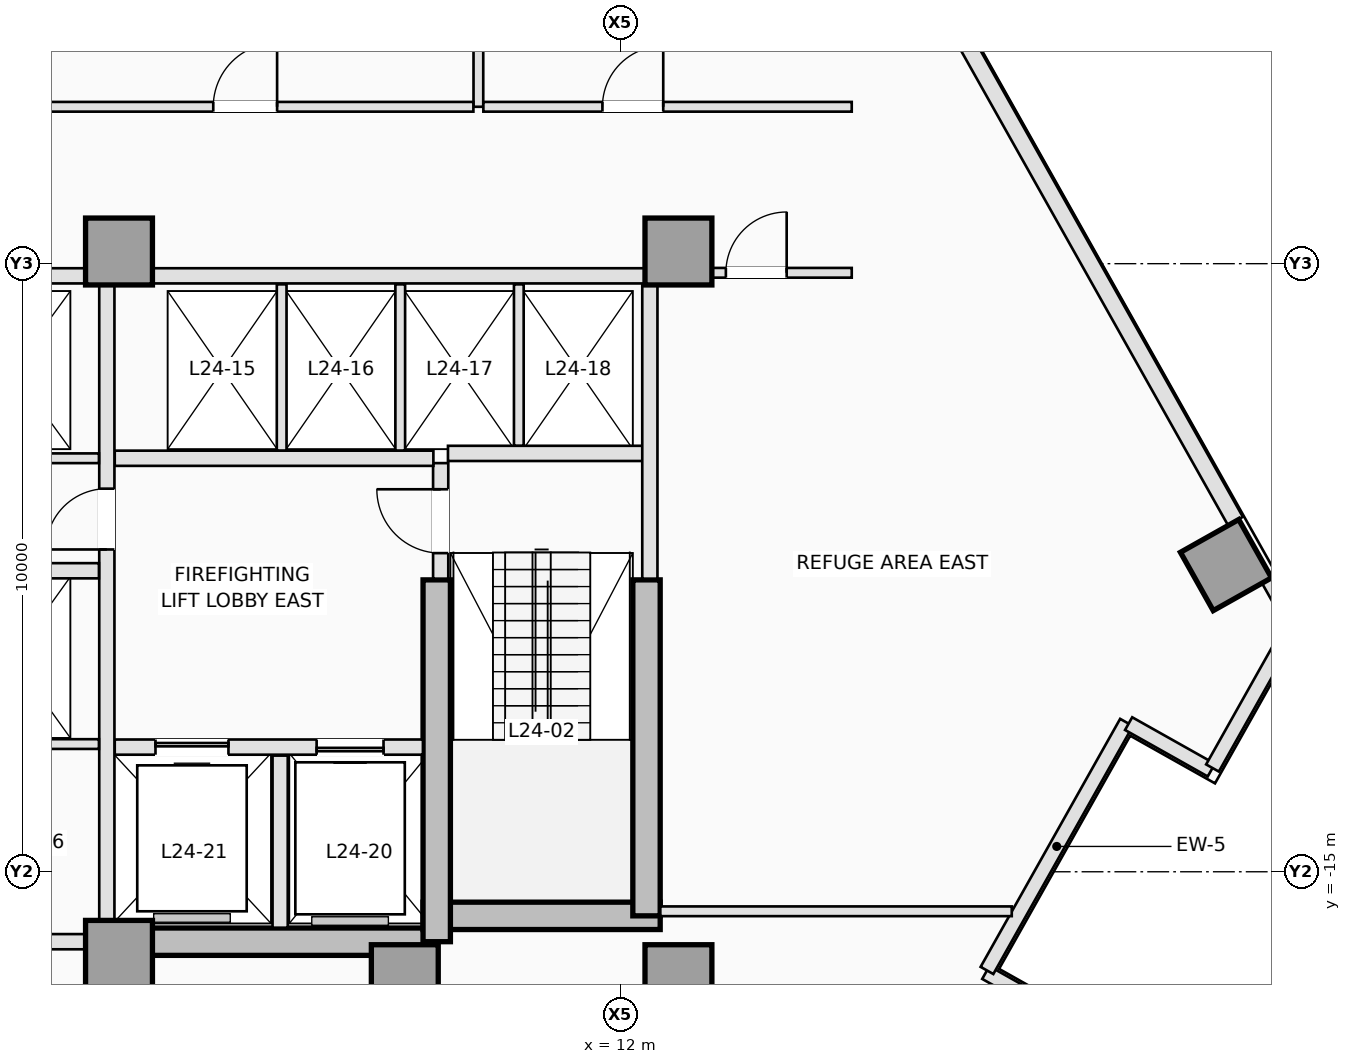
"""IFC4 building model, lengths in metres.
Left out: names, types, materials, properties, quantities, classifications, styles, units other than length and angle.
Written with IfcOpenShell. Run it as: python <this file> out.ifc"""

import sys

from ifc_helpers import new_model, si_unit, direction, frame, frame_2d, origin, origin_2d, place, context, subcontext, project, spatial, rectangle, extrude, element, fill, save


model = new_model("IFC4")
c1 = context("Model", 3, precision=1e-05, world=origin(), true_north=direction((0.0, 1.0)))
c2 = subcontext(c1, "Body", "Model", "MODEL_VIEW")
j1 = project(units=[si_unit("LENGTHUNIT", "METRE"), si_unit("PLANEANGLEUNIT", "RADIAN")], contexts=[c1])
p1 = place(None, origin())
s1 = spatial("IfcSite", under=j1, at=p1, CompositionType="ELEMENT")
p2 = place(p1, origin())
s2 = spatial("IfcBuilding", under=s1, at=p2, CompositionType="ELEMENT")
p3 = place(p2, frame((0.0, 0.0, 90.6)))
s3 = spatial("IfcBuildingStorey", under=s2, at=p3, CompositionType="ELEMENT", Elevation=90.6)
p4 = place(p3, frame((3.75, -16.15, 0.0), z_axis=(0.0, 0.0, 1.0), x_axis=(1.0, 0.0, 0.0)))
e1 = element("IfcWall", 1, at=p4, inside=s3, PredefinedType="SHEAR", context=c2, shape_type="SweptSolid", body=[
    extrude(rectangle(XDim=5.225, YDim=0.45, at=frame_2d((2.613, 0.0))), origin(), (0.0, 0.0, 1.0), 4.4),
])
p5 = place(p3, frame((8.75, -15.725, 0.0), z_axis=(0.0, 0.0, 1.0), x_axis=(1.0, 0.0, 0.0)))
e2 = element("IfcWall", 2, at=p5, inside=s3, PredefinedType="SHEAR", context=c2, shape_type="SweptSolid", body=[
    extrude(rectangle(XDim=3.9, YDim=0.45, at=frame_2d((1.95, 0.0))), origin(), (0.0, 0.0, 1.0), 4.4),
])
p6 = place(p3, frame((12.425, -15.725, 0.0), z_axis=(0.0, 0.0, 1.0), x_axis=(0.0, 1.0, 0.0)))
e3 = element("IfcWall", 3, at=p6, inside=s3, PredefinedType="SHEAR", context=c2, shape_type="SweptSolid", body=[
    extrude(rectangle(XDim=5.525, YDim=0.45, at=frame_2d((2.763, 0.0))), origin(), (0.0, 0.0, 1.0), 4.4),
])
p7 = place(p3, frame((8.975, -16.15, 0.0), z_axis=(0.0, 0.0, 1.0), x_axis=(0.0, 1.0, 0.0)))
e4 = element("IfcWall", 4, at=p7, inside=s3, PredefinedType="SHEAR", context=c2, shape_type="SweptSolid", body=[
    extrude(rectangle(XDim=5.95, YDim=0.45, at=frame_2d((2.975, 0.0))), origin(), (0.0, 0.0, 1.0), 4.4),
])
for number, where, z_axis, x_axis in (
    (5, (3.75, -16.35, 0.0), (0.0, 0.0, 1.0), (1.0, 0.0, 0.0)),
    (6, (8.45, -16.75, 0.0), (0.0, 0.0, 1.0), (1.0, 0.0, 0.0)),
    (7, (12.95, -16.75, 0.0), (0.0, 0.0, 1.0), (1.0, 0.0, 0.0)),
    (8, (3.75, -4.8, 0.0), (0.0, 0.0, 1.0), (1.0, 0.0, 0.0)),
    (9, (12.95, -4.8, 0.0), (0.0, 0.0, 1.0), (1.0, 0.0, 0.0)),
    (10, (21.955, -9.957, 0.0), (0.0, 0.0, 1.0), (0.872, 0.49, 0.0)),
):
    element("IfcColumn", number, at=place(p3, frame(where, z_axis=z_axis, x_axis=x_axis)), inside=s3, PredefinedType="COLUMN", context=c2, shape_type="SweptSolid", body=[
        extrude(rectangle(XDim=1.1, YDim=1.1, at=origin_2d()), origin(), (0.0, 0.0, 1.0), 4.4),
    ])
p8 = place(p3, frame((22.654, -10.2, 0.0), z_axis=(0.0, 0.0, 1.0), x_axis=(0.490355003566, -0.871522788272, 0.0)))
e11 = element("IfcWall", 11, at=p8, inside=s3, PredefinedType="STANDARD", context=c2, shape_type="SweptSolid", body=[
    extrude(rectangle(XDim=0.865, YDim=0.24, at=frame_2d((0.433, 0.0))), origin(), (0.0, 0.0, 1.0), 4.15),
])
p9 = place(p3, frame((17.029, -0.2, 0.0), z_axis=(0.0, 0.0, 1.0), x_axis=(0.49024893553, -0.871582458068, 0.0)))
e12 = element("IfcWall", 12, at=p9, inside=s3, PredefinedType="STANDARD", context=c2, shape_type="SweptSolid", body=[
    extrude(rectangle(XDim=10.363, YDim=0.28, at=frame_2d((5.181, 0.0))), origin(), (0.0, 0.0, 1.0), 4.15),
])
p10 = place(p3, frame((19.399, -17.442, 0.0), z_axis=(0.0, 0.0, 1.0), x_axis=(-0.871575537125, 0.490261239633, 0.0)))
e13 = element("IfcWall", 13, at=p10, inside=s3, PredefinedType="STANDARD", context=c2, shape_type="SweptSolid", body=[
    extrude(rectangle(XDim=1.6, YDim=0.24, at=frame_2d((0.8, 0.0))), origin(), (0.0, 0.0, 1.0), 4.15),
])
p11 = place(p3, frame((18.024, -16.623, 0.0), z_axis=(0.0, 0.0, 1.0), x_axis=(0.490273623647, 0.871568571001, 0.0)))
e14 = element("IfcWall", 14, at=p11, inside=s3, PredefinedType="STANDARD", context=c2, shape_type="SweptSolid", body=[
    extrude(rectangle(XDim=4.68, YDim=0.24, at=frame_2d((2.34, 0.0))), origin(), (0.0, 0.0, 1.0), 3.622),
])
p12 = place(p3, frame((20.354, -12.564, 0.0), z_axis=(0.0, 0.0, 1.0), x_axis=(0.871546278971, -0.490313250496, 0.0)))
e15 = element("IfcWall", 15, at=p12, inside=s3, PredefinedType="STANDARD", context=c2, shape_type="SweptSolid", body=[
    extrude(rectangle(XDim=1.56, YDim=0.24, at=frame_2d((0.78, 0.0))), origin(), (0.0, 0.0, 1.0), 4.15),
])
p13 = place(p3, frame((21.733, -13.294, 0.0), z_axis=(0.0, 0.0, 1.0), x_axis=(0.490265590412, 0.871573089797, 0.0)))
e16 = element("IfcWall", 16, at=p13, inside=s3, PredefinedType="STANDARD", context=c2, shape_type="SweptSolid", body=[
    extrude(rectangle(XDim=2.664, YDim=0.24, at=frame_2d((1.332, 0.0))), origin(), (0.0, 0.0, 1.0), 4.15),
])
p14 = place(p3, frame((9.04, -10.18, 0.0), z_axis=(0.0, 0.0, 1.0), x_axis=(0.0, 1.0, 0.0)))
e17 = element("IfcWall", 17, at=p14, inside=s3, PredefinedType="PARTITIONING", context=c2, shape_type="SweptSolid", body=[
    extrude(rectangle(XDim=1.9, YDim=0.25, at=frame_2d((0.95, 0.0))), origin(), (0.0, 0.0, 1.0), 4.15),
])
p15 = place(p14, frame((0.42, 0.0, 0.0)))
e18 = element("IfcOpeningElement", 18, at=p15, cuts=e17, PredefinedType="OPENING", context=c2, shape_type="SweptSolid", body=[
    extrude(rectangle(XDim=1.05, YDim=2.15, at=frame_2d((0.525, 1.075))), frame((0.0, 0.135, 0.0), z_axis=(0.0, -1.0, 0.0), x_axis=(1.0, 0.0, 0.0)), (0.0, 0.0, 1.0), 0.27),
])
p16 = place(p3, frame((9.16, -8.12, 0.0), z_axis=(0.0, 0.0, 1.0), x_axis=(1.0, 0.0, 0.0)))
e19 = element("IfcWall", 19, at=p16, inside=s3, PredefinedType="PARTITIONING", context=c2, shape_type="SweptSolid", body=[
    extrude(rectangle(XDim=3.22, YDim=0.25, at=frame_2d((1.61, 0.0))), origin(), (0.0, 0.0, 1.0), 4.15),
])
p17 = place(p3, frame((12.48, -10.18, 0.0), z_axis=(0.0, 0.0, 1.0), x_axis=(0.0, 1.0, 0.0)))
e20 = element("IfcWall", 20, at=p17, inside=s3, PredefinedType="PARTITIONING", context=c2, shape_type="SweptSolid", body=[
    extrude(rectangle(XDim=4.828, YDim=0.25, at=frame_2d((2.414, 0.0))), origin(), (0.0, 0.0, 1.0), 4.15),
])
p18 = place(p3, frame((3.68, -12.95, 0.0), z_axis=(0.0, 0.0, 1.0), x_axis=(1.0, 0.0, 0.0)))
e21 = element("IfcWall", 21, at=p18, inside=s3, PredefinedType="PARTITIONING", context=c2, shape_type="SweptSolid", body=[
    extrude(rectangle(XDim=5.068, YDim=0.25, at=frame_2d((2.534, 0.0))), origin(), (0.0, 0.0, 1.0), 4.15),
])
p19 = place(p18, frame((3.32, 0.0, 0.0)))
e22 = element("IfcOpeningElement", 22, at=p19, cuts=e21, PredefinedType="OPENING", context=c2, shape_type="SweptSolid", body=[
    extrude(rectangle(XDim=1.1, YDim=2.15, at=frame_2d((0.55, 1.075))), frame((0.0, 0.135, 0.0), z_axis=(0.0, -1.0, 0.0), x_axis=(1.0, 0.0, 0.0)), (0.0, 0.0, 1.0), 0.27),
])
p20 = place(p18, frame((0.67, 0.0, 0.0)))
e23 = element("IfcOpeningElement", 23, at=p20, cuts=e21, PredefinedType="OPENING", context=c2, shape_type="SweptSolid", body=[
    extrude(rectangle(XDim=1.2, YDim=2.15, at=frame_2d((0.6, 1.075))), frame((0.0, 0.135, 0.0), z_axis=(0.0, -1.0, 0.0), x_axis=(1.0, 0.0, 0.0)), (0.0, 0.0, 1.0), 0.27),
])
p21 = place(p3, frame((6.4, -15.92, 0.0), z_axis=(0.0, 0.0, 1.0), x_axis=(0.0, 1.0, 0.0)))
e24 = element("IfcWall", 24, at=p21, inside=s3, PredefinedType="PARTITIONING", context=c2, shape_type="SweptSolid", body=[
    extrude(rectangle(XDim=2.83, YDim=0.25, at=frame_2d((1.415, 0.0))), origin(), (0.0, 0.0, 1.0), 4.15),
])
p22 = place(p3, frame((3.68, -8.2, 0.0), z_axis=(0.0, 0.0, 1.0), x_axis=(1.0, 0.0, 0.0)))
e25 = element("IfcWall", 25, at=p22, inside=s3, PredefinedType="PARTITIONING", context=c2, shape_type="SweptSolid", body=[
    extrude(rectangle(XDim=5.24, YDim=0.25, at=frame_2d((2.62, 0.0))), origin(), (0.0, 0.0, 1.0), 4.15),
])
p23 = place(p3, frame((3.55, -15.798, 0.0), z_axis=(0.0, 0.0, 1.0), x_axis=(0.0, 1.0, 0.0)))
e26 = element("IfcWall", 26, at=p23, inside=s3, PredefinedType="PARTITIONING", context=c2, shape_type="SweptSolid", body=[
    extrude(rectangle(XDim=10.446, YDim=0.25, at=frame_2d((5.223, 0.0))), origin(), (0.0, 0.0, 1.0), 4.15),
])
p24 = place(p23, frame((6.098, 0.0, 0.0)))
e27 = element("IfcOpeningElement", 27, at=p24, cuts=e26, PredefinedType="OPENING", context=c2, shape_type="SweptSolid", body=[
    extrude(rectangle(XDim=1.0, YDim=2.15, at=frame_2d((0.5, 1.075))), frame((0.0, 0.135, 0.0), z_axis=(0.0, -1.0, 0.0), x_axis=(1.0, 0.0, 0.0)), (0.0, 0.0, 1.0), 0.27),
])
p25 = place(p3, frame((4.302, -5.2, 0.0), z_axis=(0.0, 0.0, 1.0), x_axis=(1.0, 0.0, 0.0)))
e28 = element("IfcWall", 28, at=p25, inside=s3, PredefinedType="PARTITIONING", context=c2, shape_type="SweptSolid", body=[
    extrude(rectangle(XDim=8.096, YDim=0.25, at=frame_2d((4.048, 0.0))), origin(), (0.0, 0.0, 1.0), 4.15),
])
p26 = place(p3, frame((0.95, -5.2, 0.0), z_axis=(0.0, 0.0, 1.0), x_axis=(1.0, 0.0, 0.0)))
e29 = element("IfcWall", 29, at=p26, inside=s3, PredefinedType="PARTITIONING", context=c2, shape_type="SweptSolid", body=[
    extrude(rectangle(XDim=2.248, YDim=0.25, at=frame_2d((1.124, 0.0))), origin(), (0.0, 0.0, 1.0), 4.15),
])
for number, where, z_axis, x_axis in (
    (30, (6.425, -8.073, 0.0), (0.0, 0.0, 1.0), (0.0, 1.0, 0.0)),
    (31, (8.375, -8.073, 0.0), (0.0, 0.0, 1.0), (0.0, 1.0, 0.0)),
):
    element("IfcWall", number, at=place(p3, frame(where, z_axis=z_axis, x_axis=x_axis)), inside=s3, PredefinedType="PARTITIONING", context=c2, shape_type="SweptSolid", body=[
        extrude(rectangle(XDim=2.733, YDim=0.16, at=frame_2d((1.366, 0.0))), origin(), (0.0, 0.0, 1.0), 4.15),
    ])
p27 = place(p3, frame((10.325, -7.993, 0.0), z_axis=(0.0, 0.0, 1.0), x_axis=(0.0, 1.0, 0.0)))
e32 = element("IfcWall", 32, at=p27, inside=s3, PredefinedType="PARTITIONING", context=c2, shape_type="SweptSolid", body=[
    extrude(rectangle(XDim=2.653, YDim=0.16, at=frame_2d((1.326, 0.0))), origin(), (0.0, 0.0, 1.0), 4.15),
])
p28 = place(p3, frame((-3.198, -16.15, 0.0), z_axis=(0.0, 0.0, 1.0), x_axis=(1.0, 0.0, 0.0)))
e33 = element("IfcWall", 33, at=p28, inside=s3, PredefinedType="PARTITIONING", context=c2, shape_type="SweptSolid", body=[
    extrude(rectangle(XDim=6.396, YDim=0.25, at=frame_2d((3.198, 0.0))), origin(), (0.0, 0.0, 1.0), 3.2),
])
p29 = place(p3, frame((0.95, -8.2, 0.0), z_axis=(0.0, 0.0, 1.0), x_axis=(1.0, 0.0, 0.0)))
e34 = element("IfcWall", 34, at=p29, inside=s3, PredefinedType="PARTITIONING", context=c2, shape_type="SweptSolid", body=[
    extrude(rectangle(XDim=2.47, YDim=0.16, at=frame_2d((1.235, 0.0))), origin(), (0.0, 0.0, 1.0), 4.15),
])
p30 = place(p3, frame((0.95, -10.05, 0.0), z_axis=(0.0, 0.0, 1.0), x_axis=(1.0, 0.0, 0.0)))
e35 = element("IfcWall", 35, at=p30, inside=s3, PredefinedType="PARTITIONING", context=c2, shape_type="SweptSolid", body=[
    extrude(rectangle(XDim=2.47, YDim=0.25, at=frame_2d((1.235, 0.0))), origin(), (0.0, 0.0, 1.0), 4.15),
])
p31 = place(p3, frame((-3.42, -12.9, 0.0), z_axis=(0.0, 0.0, 1.0), x_axis=(1.0, 0.0, 0.0)))
e36 = element("IfcWall", 36, at=p31, inside=s3, PredefinedType="PARTITIONING", context=c2, shape_type="SweptSolid", body=[
    extrude(rectangle(XDim=6.84, YDim=0.16, at=frame_2d((3.42, 0.0))), origin(), (0.0, 0.0, 1.0), 4.15),
])
p32 = place(p31, frame((2.98, 0.0, 0.0)))
e37 = element("IfcOpeningElement", 37, at=p32, cuts=e36, PredefinedType="OPENING", context=c2, shape_type="SweptSolid", body=[
    extrude(rectangle(XDim=0.88, YDim=2.12, at=frame_2d((0.44, 1.06))), frame((0.0, 0.09, 0.0), z_axis=(0.0, -1.0, 0.0), x_axis=(1.0, 0.0, 0.0)), (0.0, 0.0, 1.0), 0.18),
])
p33 = place(p3, frame((9.66, -2.42, 0.0), z_axis=(0.0, 0.0, 1.0), x_axis=(0.0, 1.0, 0.0)))
e38 = element("IfcWall", 38, at=p33, inside=s3, PredefinedType="PARTITIONING", context=c2, shape_type="SweptSolid", body=[
    extrude(rectangle(XDim=6.62, YDim=0.16, at=frame_2d((3.31, 0.0))), origin(), (0.0, 0.0, 1.0), 4.15),
])
p34 = place(p3, frame((12.652, -15.65, 0.0), z_axis=(0.0, 0.0, 1.0), x_axis=(1.0, 0.0, 0.0)))
e39 = element("IfcWall", 39, at=p34, inside=s3, PredefinedType="PARTITIONING", context=c2, shape_type="SweptSolid", body=[
    extrude(rectangle(XDim=5.779, YDim=0.16, at=frame_2d((2.89, 0.0))), origin(), (0.0, 0.0, 1.0), 4.15),
])
p35 = place(p3, frame((1.1, -2.42, 0.0), z_axis=(0.0, 0.0, 1.0), x_axis=(1.0, 0.0, 0.0)))
e40 = element("IfcWall", 40, at=p35, inside=s3, PredefinedType="PARTITIONING", context=c2, shape_type="SweptSolid", body=[
    extrude(rectangle(XDim=8.478, YDim=0.16, at=frame_2d((4.239, 0.0))), origin(), (0.0, 0.0, 1.0), 4.15),
])
p36 = place(p35, frame((4.2, 0.0, 0.0)))
e41 = element("IfcOpeningElement", 41, at=p36, cuts=e40, PredefinedType="OPENING", context=c2, shape_type="SweptSolid", body=[
    extrude(rectangle(XDim=1.05, YDim=2.12, at=frame_2d((0.525, 1.06))), frame((0.0, 0.09, 0.0), z_axis=(0.0, -1.0, 0.0), x_axis=(1.0, 0.0, 0.0)), (0.0, 0.0, 1.0), 0.18),
])
p37 = place(p3, frame((9.742, -2.42, 0.0), z_axis=(0.0, 0.0, 1.0), x_axis=(1.0, 0.0, 0.0)))
e42 = element("IfcWall", 42, at=p37, inside=s3, PredefinedType="PARTITIONING", context=c2, shape_type="SweptSolid", body=[
    extrude(rectangle(XDim=6.058, YDim=0.16, at=frame_2d((3.029, 0.0))), origin(), (0.0, 0.0, 1.0), 4.15),
])
p38 = place(p37, frame((1.958, 0.0, 0.0)))
e43 = element("IfcOpeningElement", 43, at=p38, cuts=e42, PredefinedType="OPENING", context=c2, shape_type="SweptSolid", body=[
    extrude(rectangle(XDim=1.0, YDim=2.15, at=frame_2d((0.5, 1.075))), frame((0.0, 0.09, 0.0), z_axis=(0.0, -1.0, 0.0), x_axis=(1.0, 0.0, 0.0)), (0.0, 0.0, 1.0), 0.18),
])
p39 = place(p3, frame((13.502, -5.15, 0.0), z_axis=(0.0, 0.0, 1.0), x_axis=(1.0, 0.0, 0.0)))
e44 = element("IfcWall", 44, at=p39, inside=s3, PredefinedType="PARTITIONING", context=c2, shape_type="SweptSolid", body=[
    extrude(rectangle(XDim=2.298, YDim=0.16, at=frame_2d((1.149, 0.0))), origin(), (0.0, 0.0, 1.0), 4.15),
])
p40 = place(p39, frame((0.228, 0.0, 0.0)))
e45 = element("IfcOpeningElement", 45, at=p40, cuts=e44, PredefinedType="OPENING", context=c2, shape_type="SweptSolid", body=[
    extrude(rectangle(XDim=1.0, YDim=2.15, at=frame_2d((0.5, 1.075))), frame((0.0, 0.09, 0.0), z_axis=(0.0, -1.0, 0.0), x_axis=(1.0, 0.0, 0.0)), (0.0, 0.0, 1.0), 0.18),
])
p41 = place(p19, origin())
e46 = element("IfcDoor", 46, at=p41, inside=s3, OperationType="SLIDING_TO_RIGHT", PredefinedType="DOOR", context=c2, shape_type="SweptSolid", body=[
    extrude(rectangle(XDim=1.1, YDim=2.15, at=frame_2d((0.55, 1.075))), frame((0.0, 0.025, 0.0), z_axis=(0.0, -1.0, 0.0), x_axis=(1.0, 0.0, 0.0)), (0.0, 0.0, 1.0), 0.05),
])
fill(e22, e46)
p42 = place(p20, origin())
e47 = element("IfcDoor", 47, at=p42, inside=s3, OperationType="SLIDING_TO_LEFT", PredefinedType="DOOR", context=c2, shape_type="SweptSolid", body=[
    extrude(rectangle(XDim=1.2, YDim=2.15, at=frame_2d((0.6, 1.075))), frame((0.0, 0.025, 0.0), z_axis=(0.0, -1.0, 0.0), x_axis=(1.0, 0.0, 0.0)), (0.0, 0.0, 1.0), 0.05),
])
fill(e23, e47)
p43 = place(p15, origin())
e48 = element("IfcDoor", 48, at=p43, inside=s3, OperationType="SINGLE_SWING_RIGHT", PredefinedType="DOOR", context=c2, shape_type="SweptSolid", body=[
    extrude(rectangle(XDim=1.05, YDim=2.15, at=frame_2d((0.525, 1.075))), frame((0.0, 0.025, 0.0), z_axis=(0.0, -1.0, 0.0), x_axis=(1.0, 0.0, 0.0)), (0.0, 0.0, 1.0), 0.05),
])
fill(e18, e48)
p44 = place(p24, origin())
e49 = element("IfcDoor", 49, at=p44, inside=s3, OperationType="SINGLE_SWING_LEFT", PredefinedType="DOOR", context=c2, shape_type="SweptSolid", body=[
    extrude(rectangle(XDim=1.0, YDim=2.15, at=frame_2d((0.5, 1.075))), frame((0.0, 0.025, 0.0), z_axis=(0.0, -1.0, 0.0), x_axis=(1.0, 0.0, 0.0)), (0.0, 0.0, 1.0), 0.05),
])
fill(e27, e49)
p45 = place(p38, origin())
e50 = element("IfcDoor", 50, at=p45, inside=s3, OperationType="SINGLE_SWING_RIGHT", PredefinedType="DOOR", context=c2, shape_type="SweptSolid", body=[
    extrude(rectangle(XDim=1.0, YDim=2.15, at=frame_2d((0.5, 1.075))), frame((0.0, 0.025, 0.0), z_axis=(0.0, -1.0, 0.0), x_axis=(1.0, 0.0, 0.0)), (0.0, 0.0, 1.0), 0.05),
])
fill(e43, e50)
p46 = place(p36, origin())
e51 = element("IfcDoor", 51, at=p46, inside=s3, OperationType="SINGLE_SWING_RIGHT", PredefinedType="DOOR", context=c2, shape_type="SweptSolid", body=[
    extrude(rectangle(XDim=1.05, YDim=2.12, at=frame_2d((0.525, 1.06))), frame((0.0, 0.025, 0.0), z_axis=(0.0, -1.0, 0.0), x_axis=(1.0, 0.0, 0.0)), (0.0, 0.0, 1.0), 0.05),
])
fill(e41, e51)
p47 = place(p40, origin())
e52 = element("IfcDoor", 52, at=p47, inside=s3, OperationType="SINGLE_SWING_RIGHT", PredefinedType="DOOR", context=c2, shape_type="SweptSolid", body=[
    extrude(rectangle(XDim=1.0, YDim=2.15, at=frame_2d((0.5, 1.075))), frame((0.0, 0.025, 0.0), z_axis=(0.0, -1.0, 0.0), x_axis=(1.0, 0.0, 0.0)), (0.0, 0.0, 1.0), 0.05),
])
fill(e45, e52)
save(model, sys.argv[1])
